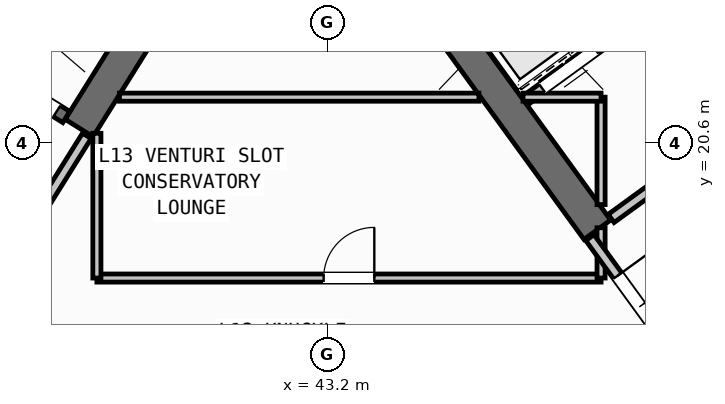
"""IFC4 building model, lengths in metres.
Left out: names, types, materials, properties, quantities, classifications, styles, units other than length and angle.
Written with IfcOpenShell. Run it as: python <this file> out.ifc"""

import sys

from ifc_helpers import new_model, si_unit, direction, frame, frame_2d, origin, place, context, subcontext, project, spatial, rectangle, extrude, source, transform, mapped, element, fill, save


model = new_model("IFC4")
c1 = context("Model", 3, precision=1e-05, world=origin(), true_north=direction((0.0, 1.0)))
c2 = subcontext(c1, "Body", "Model", "MODEL_VIEW")
j1 = project(units=[si_unit("LENGTHUNIT", "METRE"), si_unit("PLANEANGLEUNIT", "RADIAN")], contexts=[c1])
p1 = place(None, origin())
s1 = spatial("IfcSite", under=j1, at=p1, CompositionType="ELEMENT")
p2 = place(p1, origin())
s2 = spatial("IfcBuilding", under=s1, at=p2, CompositionType="ELEMENT")
p3 = place(p2, frame((0.0, 0.0, 52.8)))
s3 = spatial("IfcBuildingStorey", under=s2, at=p3, CompositionType="ELEMENT", Elevation=52.8)
p4 = place(p3, frame((40.168, 23.88, 0.0), z_axis=(0.0, 0.0, 1.0), x_axis=(-0.529893103397, -0.8480644427, 0.0)))
e1 = element("IfcWall", 1, at=p4, inside=s3, PredefinedType="SHEAR", context=c2, shape_type="SweptSolid", body=[
    extrude(rectangle(XDim=3.525, YDim=0.65, at=frame_2d((1.763, 0.0))), origin(), (0.0, 0.0, 1.0), 3.35),
])
p5 = place(p3, frame((48.526, 18.884, 0.0), z_axis=(0.0, 0.0, 1.0), x_axis=(-0.58777996584, 0.809020835181, 0.0)))
e2 = element("IfcWall", 2, at=p5, inside=s3, PredefinedType="SHEAR", context=c2, shape_type="SweptSolid", body=[
    extrude(rectangle(XDim=6.375, YDim=0.65, at=frame_2d((3.188, 0.0))), origin(), (0.0, 0.0, 1.0), 3.35),
])
p6 = place(p3, frame((38.046, 21.108, 0.0), z_axis=(0.0, 0.0, 1.0), x_axis=(-0.848054434086, 0.529909121291, 0.0)))
e3 = element("IfcWall", 3, at=p6, inside=s3, PredefinedType="SHEAR", context=c2, shape_type="SweptSolid", body=[
    extrude(rectangle(XDim=7.33, YDim=0.26, at=frame_2d((3.665, 0.0))), origin(), (0.0, 0.0, 1.0), 3.35),
])
p7 = place(p6, frame((0.22, 0.0, 0.0)))
e4 = element("IfcOpeningElement", 4, at=p7, cuts=e3, PredefinedType="OPENING", context=c2, shape_type="SweptSolid", body=[
    extrude(rectangle(XDim=1.1, YDim=2.1, at=frame_2d((0.55, 1.05))), frame((0.0, 0.14, 0.0), z_axis=(0.0, -1.0, 0.0), x_axis=(1.0, 0.0, 0.0)), (0.0, 0.0, 1.0), 0.28),
])
p8 = place(p3, frame((47.106, 21.437, 0.0), z_axis=(0.0, 0.0, 1.0), x_axis=(0.809012514015, 0.58779141893, 0.0)))
e5 = element("IfcWall", 5, at=p8, inside=s3, PredefinedType="STANDARD", context=c2, shape_type="SweptSolid", body=[
    extrude(rectangle(XDim=3.398, YDim=0.2, at=frame_2d((1.699, 0.0))), origin(), (0.0, 0.0, 1.0), 3.34),
])
p9 = place(p8, frame((0.408, 0.0, 0.0)))
e6 = element("IfcOpeningElement", 6, at=p9, cuts=e5, PredefinedType="OPENING", context=c2, shape_type="SweptSolid", body=[
    extrude(rectangle(XDim=1.3, YDim=2.2, at=frame_2d((0.65, 1.1))), frame((0.0, 0.11, 0.0), z_axis=(0.0, -1.0, 0.0), x_axis=(1.0, 0.0, 0.0)), (0.0, 0.0, 1.0), 0.22),
])
p10 = place(p3, frame((48.799, 19.107, 0.0), z_axis=(0.0, 0.0, 1.0), x_axis=(0.809012959416, 0.587790805897, 0.0)))
e7 = element("IfcWall", 7, at=p10, inside=s3, PredefinedType="STANDARD", context=c2, shape_type="SweptSolid", body=[
    extrude(rectangle(XDim=5.718, YDim=0.2, at=frame_2d((2.859, 0.0))), origin(), (0.0, 0.0, 1.0), 3.34),
])
p11 = place(p10, frame((2.498, 0.0, 0.0)))
e8 = element("IfcOpeningElement", 8, at=p11, cuts=e7, PredefinedType="OPENING", context=c2, shape_type="SweptSolid", body=[
    extrude(rectangle(XDim=1.15, YDim=2.1, at=frame_2d((0.575, 1.05))), frame((0.0, 0.11, 0.0), z_axis=(0.0, -1.0, 0.0), x_axis=(1.0, 0.0, 0.0)), (0.0, 0.0, 1.0), 0.22),
])
p12 = place(p3, frame((38.451, 20.737, 0.0), z_axis=(0.0, 0.0, 1.0), x_axis=(-0.529924799939, -0.848044637038, 0.0)))
e9 = element("IfcWall", 9, at=p12, inside=s3, PredefinedType="STANDARD", context=c2, shape_type="SweptSolid", body=[
    extrude(rectangle(XDim=2.96, YDim=0.2, at=frame_2d((1.48, 0.0))), origin(), (0.0, 0.0, 1.0), 3.34),
])
p13 = place(p12, frame((1.46, 0.0, 0.0)))
e10 = element("IfcOpeningElement", 10, at=p13, cuts=e9, PredefinedType="OPENING", context=c2, shape_type="SweptSolid", body=[
    extrude(rectangle(XDim=0.86, YDim=2.05, at=frame_2d((0.43, 1.025))), frame((0.0, 0.11, 0.0), z_axis=(0.0, -1.0, 0.0), x_axis=(1.0, 0.0, 0.0)), (0.0, 0.0, 1.0), 0.22),
])
p14 = place(p3, frame((38.65, 17.93, 0.0), z_axis=(0.0, 0.0, 1.0), x_axis=(1.0, 0.0, 0.0)))
e11 = element("IfcWall", 11, at=p14, inside=s3, PredefinedType="PARTITIONING", context=c2, shape_type="SweptSolid", body=[
    extrude(rectangle(XDim=9.95, YDim=0.16, at=frame_2d((4.975, 0.0))), origin(), (0.0, 0.0, 1.0), 3.34),
])
p15 = place(p14, frame((4.475, 0.0, 0.0)))
e12 = element("IfcOpeningElement", 12, at=p15, cuts=e11, PredefinedType="OPENING", context=c2, shape_type="SweptSolid", body=[
    extrude(rectangle(XDim=1.0, YDim=2.1, at=frame_2d((0.5, 1.05))), frame((0.0, 0.09, 0.0), z_axis=(0.0, -1.0, 0.0), x_axis=(1.0, 0.0, 0.0)), (0.0, 0.0, 1.0), 0.18),
])
p16 = place(p3, frame((38.65, 17.93, 0.0), z_axis=(0.0, 0.0, 1.0), x_axis=(0.0, 1.0, 0.0)))
e13 = element("IfcWall", 13, at=p16, inside=s3, PredefinedType="PARTITIONING", context=c2, shape_type="SweptSolid", body=[
    extrude(rectangle(XDim=2.857, YDim=0.16, at=frame_2d((1.428, 0.0))), origin(), (0.0, 0.0, 1.0), 3.34),
])
p17 = place(p3, frame((48.6, 17.93, 0.0), z_axis=(0.0, 0.0, 1.0), x_axis=(0.0, 1.0, 0.0)))
e14 = element("IfcWall", 14, at=p17, inside=s3, PredefinedType="PARTITIONING", context=c2, shape_type="SweptSolid", body=[
    extrude(rectangle(XDim=0.993, YDim=0.16, at=frame_2d((0.496, 0.0))), origin(), (0.0, 0.0, 1.0), 3.34),
])
p18 = place(p3, frame((48.6, 19.38, 0.0), z_axis=(0.0, 0.0, 1.0), x_axis=(0.0, 1.0, 0.0)))
e15 = element("IfcWall", 15, at=p18, inside=s3, PredefinedType="PARTITIONING", context=c2, shape_type="SweptSolid", body=[
    extrude(rectangle(XDim=2.12, YDim=0.16, at=frame_2d((1.06, 0.0))), origin(), (0.0, 0.0, 1.0), 3.34),
])
p19 = place(p3, frame((39.095, 21.5, 0.0), z_axis=(0.0, 0.0, 1.0), x_axis=(1.0, 0.0, 0.0)))
e16 = element("IfcWall", 16, at=p19, inside=s3, PredefinedType="PARTITIONING", context=c2, shape_type="SweptSolid", body=[
    extrude(rectangle(XDim=7.094, YDim=0.16, at=frame_2d((3.547, 0.0))), origin(), (0.0, 0.0, 1.0), 3.34),
])
p20 = place(p3, frame((47.06, 21.5, 0.0), z_axis=(0.0, 0.0, 1.0), x_axis=(1.0, 0.0, 0.0)))
e17 = element("IfcWall", 17, at=p20, inside=s3, PredefinedType="PARTITIONING", context=c2, shape_type="SweptSolid", body=[
    extrude(rectangle(XDim=1.54, YDim=0.16, at=frame_2d((0.77, 0.0))), origin(), (0.0, 0.0, 1.0), 3.34),
])
p21 = place(p3, frame((50.119, 16.333, 0.0), z_axis=(0.0, 0.0, 1.0), x_axis=(-0.587749856981, 0.809042709391, 0.0)))
e18 = element("IfcWall", 18, at=p21, inside=s3, PredefinedType="STANDARD", context=c2, shape_type="SweptSolid", body=[
    extrude(rectangle(XDim=2.96, YDim=0.2, at=frame_2d((1.48, 0.0))), origin(), (0.0, 0.0, 1.0), 3.34),
])
p22 = place(p21, frame((0.53, 0.0, 0.0)))
e19 = element("IfcOpeningElement", 19, at=p22, cuts=e18, PredefinedType="OPENING", context=c2, shape_type="SweptSolid", body=[
    extrude(rectangle(XDim=1.5, YDim=2.15, at=frame_2d((0.75, 1.075))), frame((0.0, 0.11, 0.0), z_axis=(0.0, -1.0, 0.0), x_axis=(1.0, 0.0, 0.0)), (0.0, 0.0, 1.0), 0.22),
])
m1 = source(origin(), c2, "Body", "SweptSolid", [
    extrude(rectangle(XDim=1.1, YDim=2.1, at=frame_2d((0.55, 1.05))), frame((0.0, 0.025, 0.0), z_axis=(0.0, -1.0, 0.0), x_axis=(1.0, 0.0, 0.0)), (0.0, 0.0, 1.0), 0.05),
])
p23 = place(p7, origin())
e20 = element("IfcDoor", 20, at=p23, inside=s3, OperationType="SINGLE_SWING_RIGHT", PredefinedType="DOOR", context=c2, shape_type="MappedRepresentation", body=[
    mapped(m1, transform((0.0, 0.0, 0.0), scale=1.0)),
])
fill(e4, e20)
m2 = source(origin(), c2, "Body", "SweptSolid", [
    extrude(rectangle(XDim=1.3, YDim=2.2, at=frame_2d((0.65, 1.1))), frame((0.0, 0.025, 0.0), z_axis=(0.0, -1.0, 0.0), x_axis=(1.0, 0.0, 0.0)), (0.0, 0.0, 1.0), 0.05),
])
p24 = place(p9, origin())
e21 = element("IfcDoor", 21, at=p24, inside=s3, OperationType="DOUBLE_DOOR_SLIDING", PredefinedType="DOOR", context=c2, shape_type="MappedRepresentation", body=[
    mapped(m2, transform((0.0, 0.0, 0.0), scale=1.0)),
])
fill(e6, e21)
m3 = source(origin(), c2, "Body", "SweptSolid", [
    extrude(rectangle(XDim=1.0, YDim=2.1, at=frame_2d((0.5, 1.05))), frame((0.0, 0.025, 0.0), z_axis=(0.0, -1.0, 0.0), x_axis=(1.0, 0.0, 0.0)), (0.0, 0.0, 1.0), 0.05),
])
p25 = place(p15, origin())
e22 = element("IfcDoor", 22, at=p25, inside=s3, OperationType="SINGLE_SWING_RIGHT", PredefinedType="DOOR", context=c2, shape_type="MappedRepresentation", body=[
    mapped(m3, transform((0.0, 0.0, 0.0), scale=1.0)),
])
fill(e12, e22)
m4 = source(origin(), c2, "Body", "SweptSolid", [
    extrude(rectangle(XDim=1.5, YDim=2.15, at=frame_2d((0.75, 1.075))), frame((0.0, 0.025, 0.0), z_axis=(0.0, -1.0, 0.0), x_axis=(1.0, 0.0, 0.0)), (0.0, 0.0, 1.0), 0.05),
])
p26 = place(p22, frame((1.5, 0.0, 0.0), z_axis=(0.0, 0.0, 1.0), x_axis=(-1.0, 0.0, 0.0)))
e23 = element("IfcDoor", 23, at=p26, inside=s3, OperationType="DOUBLE_DOOR_SINGLE_SWING", PredefinedType="DOOR", context=c2, shape_type="MappedRepresentation", body=[
    mapped(m4, transform((0.0, 0.0, 0.0), scale=1.0)),
])
fill(e19, e23)
save(model, sys.argv[1])
